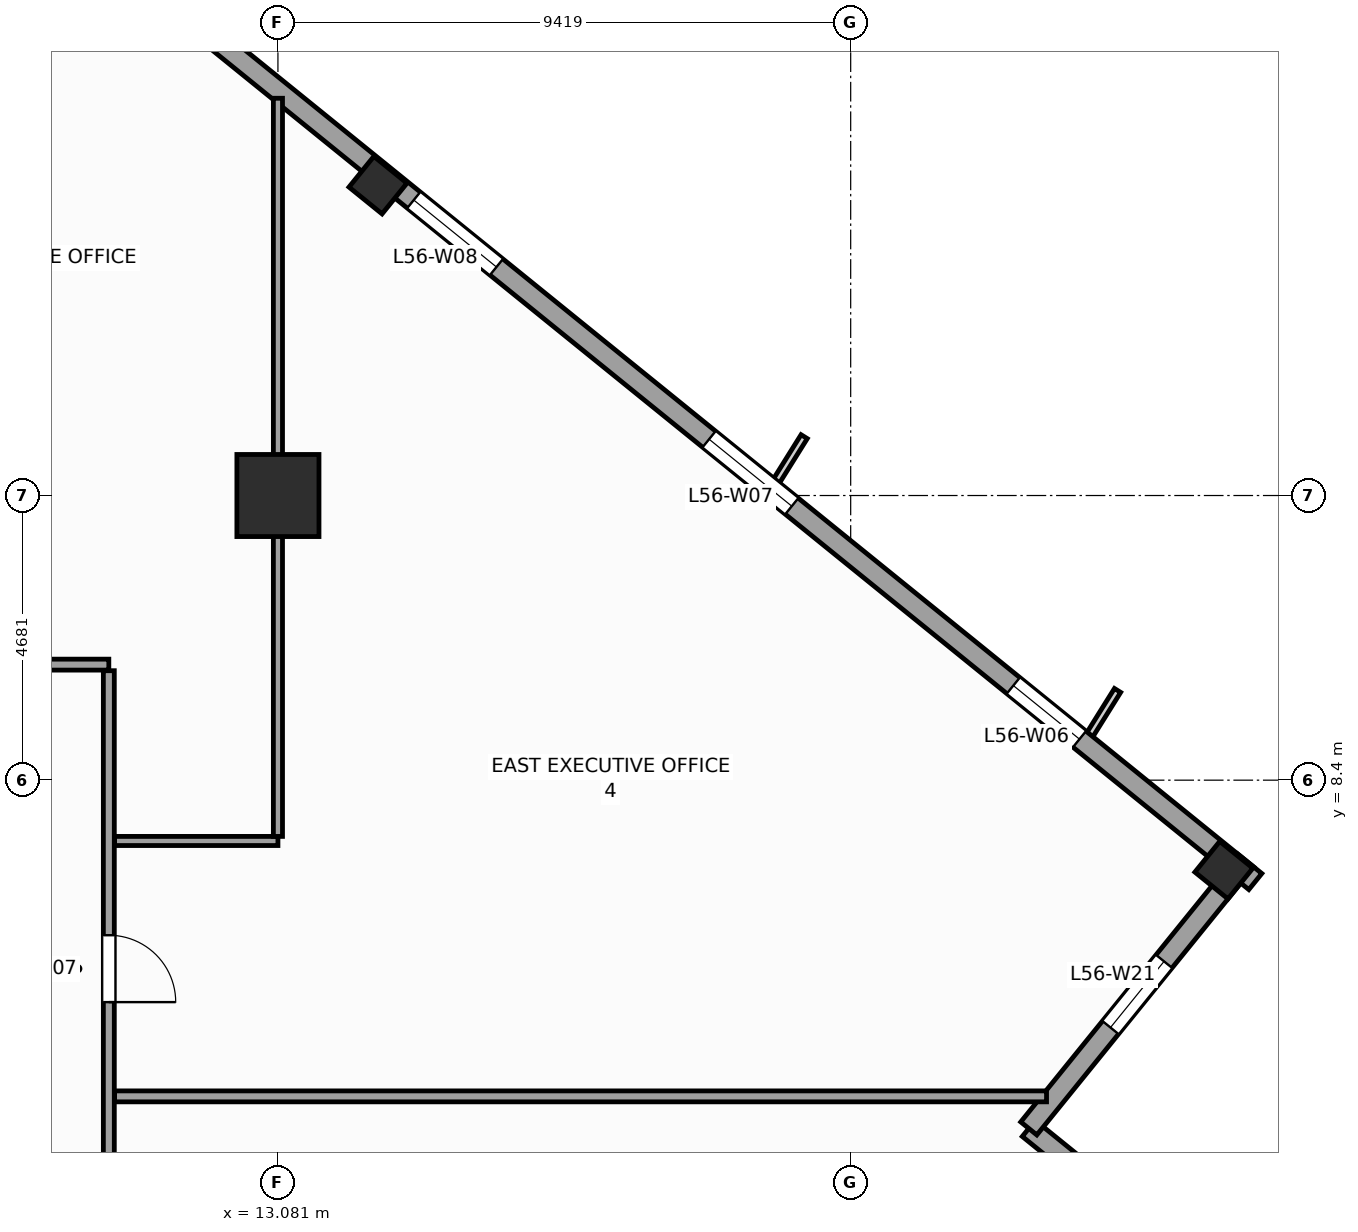
"""IFC4 building model, lengths in metres.
Left out: names, types, materials, properties, quantities, classifications, styles, units other than length and angle.
Written with IfcOpenShell. Run it as: python <this file> out.ifc"""

import sys

from ifc_helpers import new_model, si_unit, direction, frame, frame_2d, origin, origin_2d, place, context, subcontext, project, spatial, rectangle, extrude, source, transform, mapped, element, fill, save


model = new_model("IFC4")
c1 = context("Model", 3, precision=1e-05, world=origin(), true_north=direction((0.0, 1.0)))
c2 = subcontext(c1, "Body", "Model", "MODEL_VIEW")
j1 = project(units=[si_unit("LENGTHUNIT", "METRE"), si_unit("PLANEANGLEUNIT", "RADIAN")], contexts=[c1])
p1 = place(None, origin())
s1 = spatial("IfcSite", under=j1, at=p1, CompositionType="ELEMENT")
p2 = place(p1, origin())
s2 = spatial("IfcBuilding", under=s1, at=p2, CompositionType="ELEMENT")
p3 = place(p2, frame((0.0, 0.0, 232.9)))
s3 = spatial("IfcBuildingStorey", under=s2, at=p3, CompositionType="ELEMENT", Elevation=232.9)
m1 = source(origin(), c2, "Body", "SweptSolid", [
    extrude(rectangle(XDim=1.35, YDim=1.35, at=origin_2d()), origin(), (0.0, 0.0, 1.0), 3.9),
])
p4 = place(p3, frame((13.081, 13.081, 0.0), z_axis=(0.0, 0.0, 1.0), x_axis=(1.0, 0.0, 0.0)))
e1 = element("IfcColumn", 1, at=p4, inside=s3, PredefinedType="COLUMN", context=c2, shape_type="MappedRepresentation", body=[
    mapped(m1, transform((0.0, 0.0, 0.0), scale=1.0)),
])
m2 = source(origin(), c2, "Body", "SweptSolid", [
    extrude(rectangle(XDim=0.65, YDim=0.7, at=origin_2d()), origin(), (0.0, 0.0, 1.0), 3.9),
])
for number, where, z_axis, x_axis in (
    (2, (28.637, 6.92, 0.0), (0.0, 0.0, 1.0), (0.629, 0.777, 0.0)),
    (3, (14.726, 18.185, 0.0), (0.0, 0.0, 1.0), (0.629, 0.777, 0.0)),
):
    element("IfcColumn", number, at=place(p3, frame(where, z_axis=z_axis, x_axis=x_axis)), inside=s3, PredefinedType="COLUMN", context=c2, shape_type="MappedRepresentation", body=[
        mapped(m2, transform((0.0, 0.0, 0.0), scale=1.0)),
    ])
p5 = place(p3, frame((29.703, -0.789, 0.0), z_axis=(0.0, 0.0, 1.0), x_axis=(-0.77714355312, 0.629323365087, 0.0)))
e4 = element("IfcWall", 4, at=p5, inside=s3, PredefinedType="STANDARD", context=c2, shape_type="SweptSolid", body=[
    extrude(rectangle(XDim=5.5, YDim=0.34, at=frame_2d((2.75, 0.0))), origin(), (0.0, 0.0, 1.0), 3.66),
])
p6 = place(p3, frame((25.429, 2.673, 0.0), z_axis=(0.0, 0.0, 1.0), x_axis=(0.629299794138, 0.777162640055, 0.0)))
e5 = element("IfcWall", 5, at=p6, inside=s3, PredefinedType="STANDARD", context=c2, shape_type="SweptSolid", body=[
    extrude(rectangle(XDim=5.67, YDim=0.34, at=frame_2d((2.835, 0.0))), origin(), (0.0, 0.0, 1.0), 3.66),
])
p7 = place(p6, frame((2.135, 0.0, 0.48)))
e6 = element("IfcOpeningElement", 6, at=p7, cuts=e5, PredefinedType="OPENING", context=c2, shape_type="SweptSolid", body=[
    extrude(rectangle(XDim=1.4, YDim=2.4, at=frame_2d((0.7, 1.2))), frame((0.0, 0.18, 0.0), z_axis=(0.0, -1.0, 0.0), x_axis=(1.0, 0.0, 0.0)), (0.0, 0.0, 1.0), 0.36),
])
p8 = place(p3, frame((29.154, 6.733, 0.0), z_axis=(0.0, 0.0, 1.0), x_axis=(-0.77714192302, 0.629325378072, 0.0)))
e7 = element("IfcWall", 7, at=p8, inside=s3, PredefinedType="STANDARD", context=c2, shape_type="SweptSolid", body=[
    extrude(rectangle(XDim=36.84, YDim=0.34, at=frame_2d((18.42, 0.0))), origin(), (0.0, 0.0, 1.0), 2.96),
])
p9 = place(p8, frame((3.721, 0.0, 0.48)))
e8 = element("IfcOpeningElement", 8, at=p9, cuts=e7, PredefinedType="OPENING", context=c2, shape_type="SweptSolid", body=[
    extrude(rectangle(XDim=1.4, YDim=2.4, at=frame_2d((0.7, 1.2))), frame((0.0, 0.18, 0.0), z_axis=(0.0, -1.0, 0.0), x_axis=(1.0, 0.0, 0.0)), (0.0, 0.0, 1.0), 0.36),
])
p10 = place(p8, frame((9.809, 0.0, 0.58)))
e9 = element("IfcOpeningElement", 9, at=p10, cuts=e7, PredefinedType="OPENING", context=c2, shape_type="SweptSolid", body=[
    extrude(rectangle(XDim=1.75, YDim=2.3, at=frame_2d((0.875, 1.15))), frame((0.0, 0.18, 0.0), z_axis=(0.0, -1.0, 0.0), x_axis=(1.0, 0.0, 0.0)), (0.0, 0.0, 1.0), 0.36),
])
p11 = place(p8, frame((16.058, 0.0, 0.58)))
e10 = element("IfcOpeningElement", 10, at=p11, cuts=e7, PredefinedType="OPENING", context=c2, shape_type="SweptSolid", body=[
    extrude(rectangle(XDim=1.75, YDim=2.3, at=frame_2d((0.875, 1.15))), frame((0.0, 0.18, 0.0), z_axis=(0.0, -1.0, 0.0), x_axis=(1.0, 0.0, 0.0)), (0.0, 0.0, 1.0), 0.36),
])
p12 = place(p8, frame((24.176, 0.0, 0.58)))
e11 = element("IfcOpeningElement", 11, at=p12, cuts=e7, PredefinedType="OPENING", context=c2, shape_type="SweptSolid", body=[
    extrude(rectangle(XDim=1.75, YDim=2.3, at=frame_2d((0.875, 1.15))), frame((0.0, 0.18, 0.0), z_axis=(0.0, -1.0, 0.0), x_axis=(1.0, 0.0, 0.0)), (0.0, 0.0, 1.0), 0.36),
])
p13 = place(p8, frame((32.482, 0.0, 0.48)))
e12 = element("IfcOpeningElement", 12, at=p13, cuts=e7, PredefinedType="OPENING", context=c2, shape_type="SweptSolid", body=[
    extrude(rectangle(XDim=1.4, YDim=2.4, at=frame_2d((0.7, 1.2))), frame((0.0, 0.18, 0.0), z_axis=(0.0, -1.0, 0.0), x_axis=(1.0, 0.0, 0.0)), (0.0, 0.0, 1.0), 0.36),
])
p14 = place(p3, frame((-11.4, 10.3, 0.0), z_axis=(0.0, 0.0, 1.0), x_axis=(1.0, 0.0, 0.0)))
e13 = element("IfcWall", 13, at=p14, inside=s3, PredefinedType="PARTITIONING", context=c2, shape_type="SweptSolid", body=[
    extrude(rectangle(XDim=21.7, YDim=0.18, at=frame_2d((10.85, 0.0))), origin(), (0.0, 0.0, 1.0), 3.66),
])
p15 = place(p14, frame((10.925, 0.0, 0.0)))
e14 = element("IfcOpeningElement", 14, at=p15, cuts=e13, PredefinedType="OPENING", context=c2, shape_type="SweptSolid", body=[
    extrude(rectangle(XDim=0.95, YDim=2.1, at=frame_2d((0.475, 1.05))), frame((0.0, 0.1, 0.0), z_axis=(0.0, -1.0, 0.0), x_axis=(1.0, 0.0, 0.0)), (0.0, 0.0, 1.0), 0.2),
])
p16 = place(p14, frame((3.724, 0.0, 0.0)))
e15 = element("IfcOpeningElement", 15, at=p16, cuts=e13, PredefinedType="OPENING", context=c2, shape_type="SweptSolid", body=[
    extrude(rectangle(XDim=1.1, YDim=2.2, at=frame_2d((0.55, 1.1))), frame((0.0, 0.1, 0.0), z_axis=(0.0, -1.0, 0.0), x_axis=(1.0, 0.0, 0.0)), (0.0, 0.0, 1.0), 0.2),
])
p17 = place(p14, frame((8.326, 0.0, 0.0)))
e16 = element("IfcOpeningElement", 16, at=p17, cuts=e13, PredefinedType="OPENING", context=c2, shape_type="SweptSolid", body=[
    extrude(rectangle(XDim=1.1, YDim=2.2, at=frame_2d((0.55, 1.1))), frame((0.0, 0.1, 0.0), z_axis=(0.0, -1.0, 0.0), x_axis=(1.0, 0.0, 0.0)), (0.0, 0.0, 1.0), 0.2),
])
p18 = place(p14, frame((18.085, 0.0, 0.0)))
e17 = element("IfcOpeningElement", 17, at=p18, cuts=e13, PredefinedType="OPENING", context=c2, shape_type="SweptSolid", body=[
    extrude(rectangle(XDim=1.1, YDim=2.2, at=frame_2d((0.55, 1.1))), frame((0.0, 0.1, 0.0), z_axis=(0.0, -1.0, 0.0), x_axis=(1.0, 0.0, 0.0)), (0.0, 0.0, 1.0), 0.2),
])
p19 = place(p3, frame((10.3, -10.2, 0.0), z_axis=(0.0, 0.0, 1.0), x_axis=(0.0, 1.0, 0.0)))
e18 = element("IfcWall", 18, at=p19, inside=s3, PredefinedType="PARTITIONING", context=c2, shape_type="SweptSolid", body=[
    extrude(rectangle(XDim=20.4, YDim=0.18, at=frame_2d((10.2, 0.0))), origin(), (0.0, 0.0, 1.0), 3.66),
])
p20 = place(p19, frame((14.95, 0.0, 0.0)))
e19 = element("IfcOpeningElement", 19, at=p20, cuts=e18, PredefinedType="OPENING", context=c2, shape_type="SweptSolid", body=[
    extrude(rectangle(XDim=1.1, YDim=2.2, at=frame_2d((0.55, 1.1))), frame((0.0, 0.1, 0.0), z_axis=(0.0, -1.0, 0.0), x_axis=(1.0, 0.0, 0.0)), (0.0, 0.0, 1.0), 0.2),
])
p21 = place(p19, frame((9.65, 0.0, 0.0)))
e20 = element("IfcOpeningElement", 20, at=p21, cuts=e18, PredefinedType="OPENING", context=c2, shape_type="SweptSolid", body=[
    extrude(rectangle(XDim=1.1, YDim=2.2, at=frame_2d((0.55, 1.1))), frame((0.0, 0.1, 0.0), z_axis=(0.0, -1.0, 0.0), x_axis=(1.0, 0.0, 0.0)), (0.0, 0.0, 1.0), 0.2),
])
p22 = place(p19, frame((4.35, 0.0, 0.0)))
e21 = element("IfcOpeningElement", 21, at=p22, cuts=e18, PredefinedType="OPENING", context=c2, shape_type="SweptSolid", body=[
    extrude(rectangle(XDim=1.1, YDim=2.2, at=frame_2d((0.55, 1.1))), frame((0.0, 0.1, 0.0), z_axis=(0.0, -1.0, 0.0), x_axis=(1.0, 0.0, 0.0)), (0.0, 0.0, 1.0), 0.2),
])
p23 = place(p3, frame((10.395, 3.2, 0.0), z_axis=(0.0, 0.0, 1.0), x_axis=(1.0, 0.0, 0.0)))
e22 = element("IfcWall", 22, at=p23, inside=s3, PredefinedType="PARTITIONING", context=c2, shape_type="SweptSolid", body=[
    extrude(rectangle(XDim=15.326, YDim=0.18, at=frame_2d((7.663, 0.0))), origin(), (0.0, 0.0, 1.0), 3.66),
])
p24 = place(p3, frame((10.395, 7.4, 0.0), z_axis=(0.0, 0.0, 1.0), x_axis=(1.0, 0.0, 0.0)))
e23 = element("IfcWall", 23, at=p24, inside=s3, PredefinedType="PARTITIONING", context=c2, shape_type="SweptSolid", body=[
    extrude(rectangle(XDim=2.686, YDim=0.15, at=frame_2d((1.343, 0.0))), origin(), (0.0, 0.0, 1.0), 3.66),
])
p25 = place(p3, frame((13.081, 7.475, 0.0), z_axis=(0.0, 0.0, 1.0), x_axis=(0.0, 1.0, 0.0)))
e24 = element("IfcWall", 24, at=p25, inside=s3, PredefinedType="PARTITIONING", context=c2, shape_type="SweptSolid", body=[
    extrude(rectangle(XDim=12.139, YDim=0.15, at=frame_2d((6.069, 0.0))), origin(), (0.0, 0.0, 1.0), 2.76),
])
m3 = source(origin(), c2, "Body", "SweptSolid", [
    extrude(rectangle(XDim=1.4, YDim=2.4, at=frame_2d((0.7, 1.2))), frame((0.0, 0.03, 0.0), z_axis=(0.0, -1.0, 0.0), x_axis=(1.0, 0.0, 0.0)), (0.0, 0.0, 1.0), 0.06),
])
p26 = place(p9, origin())
e25 = element("IfcWindow", 25, at=p26, inside=s3, PartitioningType="SINGLE_PANEL", PredefinedType="WINDOW", context=c2, shape_type="MappedRepresentation", body=[
    mapped(m3, transform((0.0, 0.0, 0.0), scale=1.0)),
])
fill(e8, e25)
m4 = source(origin(), c2, "Body", "SweptSolid", [
    extrude(rectangle(XDim=1.75, YDim=2.3, at=frame_2d((0.875, 1.15))), frame((0.0, 0.03, 0.0), z_axis=(0.0, -1.0, 0.0), x_axis=(1.0, 0.0, 0.0)), (0.0, 0.0, 1.0), 0.06),
])
p27 = place(p10, origin())
e26 = element("IfcWindow", 26, at=p27, inside=s3, PartitioningType="SINGLE_PANEL", PredefinedType="WINDOW", context=c2, shape_type="MappedRepresentation", body=[
    mapped(m4, transform((0.0, 0.0, 0.0), scale=1.0)),
])
fill(e9, e26)
p28 = place(p11, origin())
e27 = element("IfcWindow", 27, at=p28, inside=s3, PartitioningType="SINGLE_PANEL", PredefinedType="WINDOW", context=c2, shape_type="MappedRepresentation", body=[
    mapped(m4, transform((0.0, 0.0, 0.0), scale=1.0)),
])
fill(e10, e27)
p29 = place(p7, origin())
e28 = element("IfcWindow", 28, at=p29, inside=s3, PartitioningType="SINGLE_PANEL", PredefinedType="WINDOW", context=c2, shape_type="MappedRepresentation", body=[
    mapped(m3, transform((0.0, 0.0, 0.0), scale=1.0)),
])
fill(e6, e28)
m5 = source(origin(), c2, "Body", "SweptSolid", [
    extrude(rectangle(XDim=1.1, YDim=2.2, at=frame_2d((0.55, 1.1))), frame((0.0, 0.025, 0.0), z_axis=(0.0, -1.0, 0.0), x_axis=(1.0, 0.0, 0.0)), (0.0, 0.0, 1.0), 0.05),
])
p30 = place(p20, frame((1.1, 0.0, 0.0), z_axis=(0.0, 0.0, 1.0), x_axis=(-1.0, 0.0, 0.0)))
e29 = element("IfcDoor", 29, at=p30, inside=s3, OperationType="SINGLE_SWING_LEFT", PredefinedType="DOOR", context=c2, shape_type="MappedRepresentation", body=[
    mapped(m5, transform((0.0, 0.0, 0.0), scale=1.0)),
])
fill(e19, e29)
save(model, sys.argv[1])
